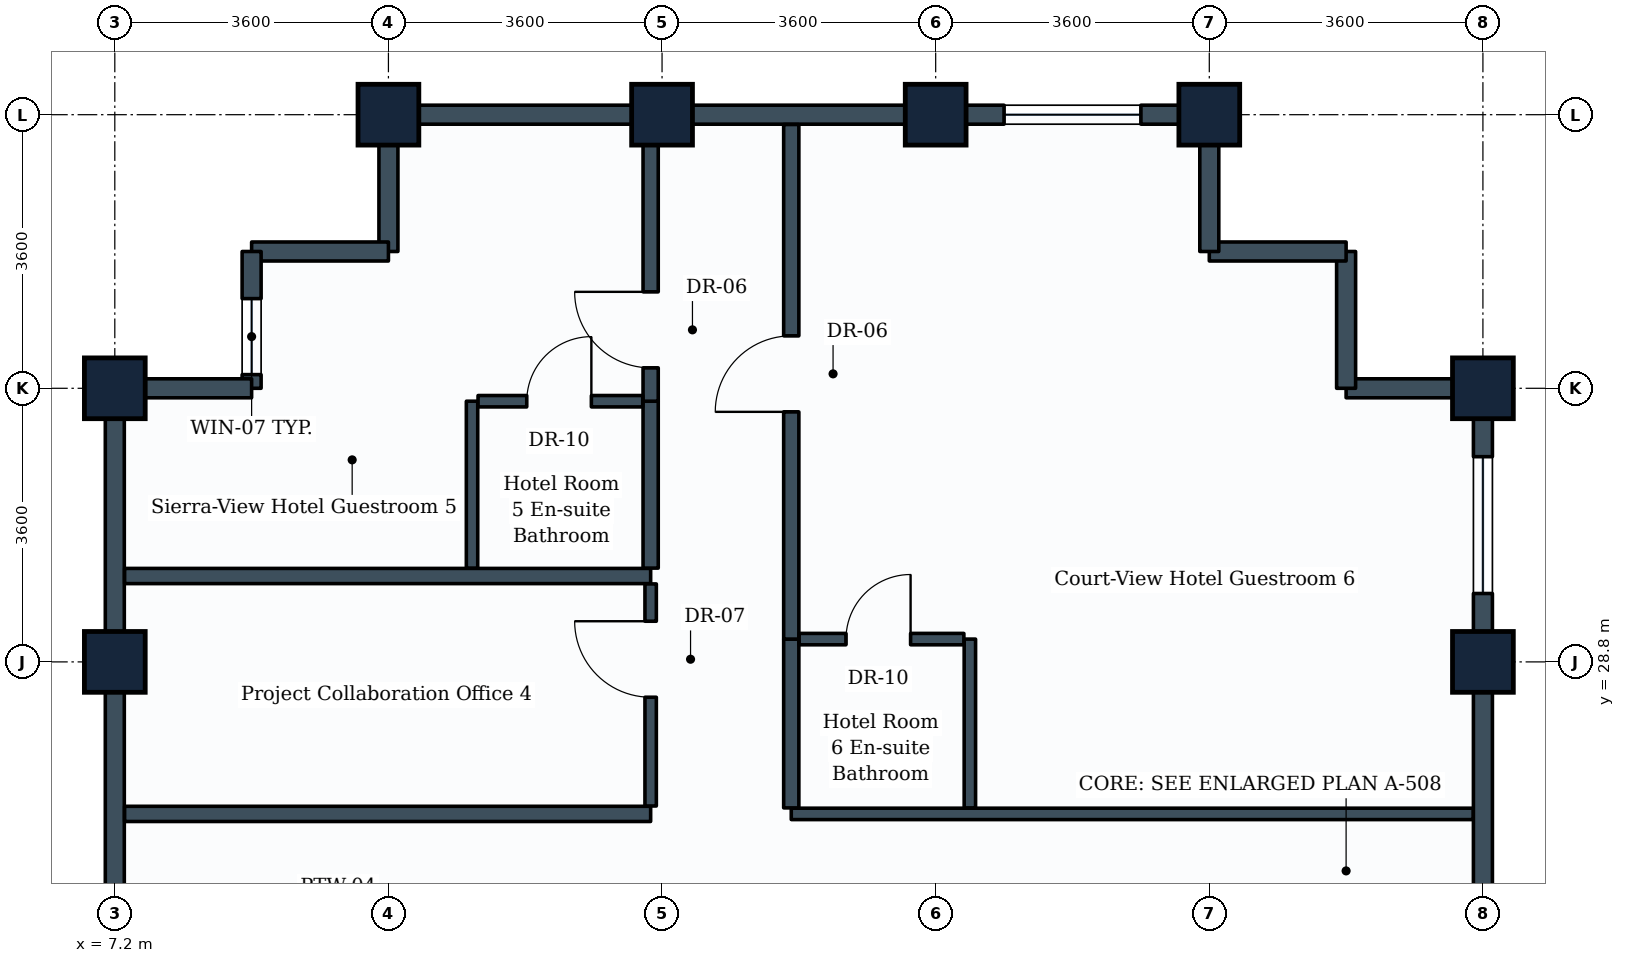
"""IFC4 building model, lengths in metres.
Left out: names, types, materials, properties, quantities, classifications, styles, units other than length and angle.
Written with IfcOpenShell. Run it as: python <this file> out.ifc"""

import sys

from ifc_helpers import new_model, si_unit, direction, frame, frame_2d, origin, origin_2d, place, context, subcontext, project, spatial, rectangle, extrude, element, fill, save


model = new_model("IFC4")
c1 = context("Model", 3, precision=1e-05, world=origin(), true_north=direction((0.0, 1.0)))
c2 = subcontext(c1, "Body", "Model", "MODEL_VIEW")
j1 = project(units=[si_unit("LENGTHUNIT", "METRE"), si_unit("PLANEANGLEUNIT", "RADIAN")], contexts=[c1])
p1 = place(None, origin())
s1 = spatial("IfcSite", under=j1, at=p1, CompositionType="ELEMENT")
p2 = place(p1, origin())
s2 = spatial("IfcBuilding", under=s1, at=p2, CompositionType="ELEMENT")
p3 = place(p2, frame((0.0, 0.0, 242.6)))
s3 = spatial("IfcBuildingStorey", under=s2, at=p3, CompositionType="ELEMENT", Elevation=242.6)
for number, where, z_axis, x_axis in (
    (1, (7.2, 28.8, 0.0), (0.0, 0.0, 1.0), (0.0, 1.0, 0.0)),
    (2, (7.2, 32.4, 0.0), (0.0, 0.0, 1.0), (0.0, 1.0, 0.0)),
    (3, (10.8, 36.0, 0.0), (0.0, 0.0, 1.0), (1.0, 0.0, 0.0)),
    (4, (14.4, 36.0, 0.0), (0.0, 0.0, 1.0), (1.0, 0.0, 0.0)),
    (5, (18.0, 36.0, 0.0), (0.0, 0.0, 1.0), (1.0, 0.0, 0.0)),
    (6, (21.6, 36.0, 0.0), (0.0, 0.0, 1.0), (1.0, 0.0, 0.0)),
    (7, (25.2, 28.8, 0.0), (0.0, 0.0, 1.0), (0.0, 1.0, 0.0)),
    (8, (25.2, 32.4, 0.0), (0.0, 0.0, 1.0), (0.0, 1.0, 0.0)),
):
    element("IfcColumn", number, at=place(p3, frame(where, z_axis=z_axis, x_axis=x_axis)), inside=s3, PredefinedType="COLUMN", context=c2, shape_type="SweptSolid", body=[
        extrude(rectangle(XDim=0.8, YDim=0.8, at=origin_2d()), origin(), (0.0, 0.0, 1.0), 3.6),
    ])
p4 = place(p3, frame((25.2, 28.8, 0.0), z_axis=(0.0, 0.0, 1.0), x_axis=(0.0, -1.0, 0.0)))
e9 = element("IfcWall", 9, at=p4, inside=s3, PredefinedType="STANDARD", context=c2, shape_type="SweptSolid", body=[
    extrude(rectangle(XDim=3.6, YDim=0.25, at=frame_2d((1.8, 0.0))), origin(), (0.0, 0.0, 1.0), 2.83),
])
p5 = place(p3, frame((25.2, 32.4, 0.0), z_axis=(0.0, 0.0, 1.0), x_axis=(0.0, -1.0, 0.0)))
e10 = element("IfcWall", 10, at=p5, inside=s3, PredefinedType="STANDARD", context=c2, shape_type="SweptSolid", body=[
    extrude(rectangle(XDim=3.6, YDim=0.25, at=frame_2d((1.8, 0.0))), origin(), (0.0, 0.0, 1.0), 2.83),
])
p6 = place(p5, frame((0.9, 0.0, 0.85)))
e11 = element("IfcOpeningElement", 11, at=p6, cuts=e10, PredefinedType="OPENING", context=c2, shape_type="SweptSolid", body=[
    extrude(rectangle(XDim=1.8, YDim=1.35, at=frame_2d((0.9, 0.675))), frame((0.0, 0.135, 0.0), z_axis=(0.0, -1.0, 0.0), x_axis=(1.0, 0.0, 0.0)), (0.0, 0.0, 1.0), 0.27),
])
p7 = place(p3, frame((23.4, 32.4, 0.0), z_axis=(0.0, 0.0, 1.0), x_axis=(1.0, 0.0, 0.0)))
e12 = element("IfcWall", 12, at=p7, inside=s3, PredefinedType="STANDARD", context=c2, shape_type="SweptSolid", body=[
    extrude(rectangle(XDim=1.8, YDim=0.25, at=frame_2d((0.9, 0.0))), origin(), (0.0, 0.0, 1.0), 2.83),
])
p8 = place(p3, frame((23.4, 32.4, 0.0), z_axis=(0.0, 0.0, 1.0), x_axis=(0.0, 1.0, 0.0)))
e13 = element("IfcWall", 13, at=p8, inside=s3, PredefinedType="STANDARD", context=c2, shape_type="SweptSolid", body=[
    extrude(rectangle(XDim=1.8, YDim=0.25, at=frame_2d((0.9, 0.0))), origin(), (0.0, 0.0, 1.0), 3.335),
])
p9 = place(p3, frame((21.6, 34.2, 0.0), z_axis=(0.0, 0.0, 1.0), x_axis=(1.0, 0.0, 0.0)))
e14 = element("IfcWall", 14, at=p9, inside=s3, PredefinedType="STANDARD", context=c2, shape_type="SweptSolid", body=[
    extrude(rectangle(XDim=1.8, YDim=0.25, at=frame_2d((0.9, 0.0))), origin(), (0.0, 0.0, 1.0), 3.335),
])
p10 = place(p3, frame((21.6, 34.2, 0.0), z_axis=(0.0, 0.0, 1.0), x_axis=(0.0, 1.0, 0.0)))
e15 = element("IfcWall", 15, at=p10, inside=s3, PredefinedType="STANDARD", context=c2, shape_type="SweptSolid", body=[
    extrude(rectangle(XDim=1.8, YDim=0.25, at=frame_2d((0.9, 0.0))), origin(), (0.0, 0.0, 1.0), 2.83),
])
p11 = place(p3, frame((18.0, 36.0, 0.0), z_axis=(0.0, 0.0, 1.0), x_axis=(1.0, 0.0, 0.0)))
e16 = element("IfcWall", 16, at=p11, inside=s3, PredefinedType="STANDARD", context=c2, shape_type="SweptSolid", body=[
    extrude(rectangle(XDim=3.6, YDim=0.25, at=frame_2d((1.8, 0.0))), origin(), (0.0, 0.0, 1.0), 2.83),
])
p12 = place(p11, frame((0.9, 0.0, 0.85)))
e17 = element("IfcOpeningElement", 17, at=p12, cuts=e16, PredefinedType="OPENING", context=c2, shape_type="SweptSolid", body=[
    extrude(rectangle(XDim=1.8, YDim=1.35, at=frame_2d((0.9, 0.675))), frame((0.0, 0.135, 0.0), z_axis=(0.0, -1.0, 0.0), x_axis=(1.0, 0.0, 0.0)), (0.0, 0.0, 1.0), 0.27),
])
p13 = place(p3, frame((14.4, 36.0, 0.0), z_axis=(0.0, 0.0, 1.0), x_axis=(1.0, 0.0, 0.0)))
e18 = element("IfcWall", 18, at=p13, inside=s3, PredefinedType="STANDARD", context=c2, shape_type="SweptSolid", body=[
    extrude(rectangle(XDim=3.6, YDim=0.25, at=frame_2d((1.8, 0.0))), origin(), (0.0, 0.0, 1.0), 2.83),
])
p14 = place(p3, frame((10.8, 36.0, 0.0), z_axis=(0.0, 0.0, 1.0), x_axis=(1.0, 0.0, 0.0)))
e19 = element("IfcWall", 19, at=p14, inside=s3, PredefinedType="STANDARD", context=c2, shape_type="SweptSolid", body=[
    extrude(rectangle(XDim=3.6, YDim=0.25, at=frame_2d((1.8, 0.0))), origin(), (0.0, 0.0, 1.0), 2.83),
])
p15 = place(p3, frame((10.8, 34.2, 0.0), z_axis=(0.0, 0.0, 1.0), x_axis=(0.0, 1.0, 0.0)))
e20 = element("IfcWall", 20, at=p15, inside=s3, PredefinedType="STANDARD", context=c2, shape_type="SweptSolid", body=[
    extrude(rectangle(XDim=1.8, YDim=0.25, at=frame_2d((0.9, 0.0))), origin(), (0.0, 0.0, 1.0), 2.83),
])
p16 = place(p3, frame((9.0, 34.2, 0.0), z_axis=(0.0, 0.0, 1.0), x_axis=(1.0, 0.0, 0.0)))
e21 = element("IfcWall", 21, at=p16, inside=s3, PredefinedType="STANDARD", context=c2, shape_type="SweptSolid", body=[
    extrude(rectangle(XDim=1.8, YDim=0.25, at=frame_2d((0.9, 0.0))), origin(), (0.0, 0.0, 1.0), 3.335),
])
p17 = place(p3, frame((9.0, 32.4, 0.0), z_axis=(0.0, 0.0, 1.0), x_axis=(0.0, 1.0, 0.0)))
e22 = element("IfcWall", 22, at=p17, inside=s3, PredefinedType="STANDARD", context=c2, shape_type="SweptSolid", body=[
    extrude(rectangle(XDim=1.8, YDim=0.25, at=frame_2d((0.9, 0.0))), origin(), (0.0, 0.0, 1.0), 3.335),
])
p18 = place(p17, frame((0.18, 0.0, 0.85)))
e23 = element("IfcOpeningElement", 23, at=p18, cuts=e22, PredefinedType="OPENING", context=c2, shape_type="SweptSolid", body=[
    extrude(rectangle(XDim=1.0, YDim=1.35, at=frame_2d((0.5, 0.675))), frame((0.0, 0.135, 0.0), z_axis=(0.0, -1.0, 0.0), x_axis=(1.0, 0.0, 0.0)), (0.0, 0.0, 1.0), 0.27),
])
p19 = place(p3, frame((7.2, 32.4, 0.0), z_axis=(0.0, 0.0, 1.0), x_axis=(1.0, 0.0, 0.0)))
e24 = element("IfcWall", 24, at=p19, inside=s3, PredefinedType="STANDARD", context=c2, shape_type="SweptSolid", body=[
    extrude(rectangle(XDim=1.8, YDim=0.25, at=frame_2d((0.9, 0.0))), origin(), (0.0, 0.0, 1.0), 2.83),
])
p20 = place(p3, frame((7.2, 28.8, 0.0), z_axis=(0.0, 0.0, 1.0), x_axis=(0.0, 1.0, 0.0)))
e25 = element("IfcWall", 25, at=p20, inside=s3, PredefinedType="STANDARD", context=c2, shape_type="SweptSolid", body=[
    extrude(rectangle(XDim=3.6, YDim=0.25, at=frame_2d((1.8, 0.0))), origin(), (0.0, 0.0, 1.0), 2.83),
])
p21 = place(p3, frame((7.2, 25.2, 0.0), z_axis=(0.0, 0.0, 1.0), x_axis=(0.0, 1.0, 0.0)))
e26 = element("IfcWall", 26, at=p21, inside=s3, PredefinedType="STANDARD", context=c2, shape_type="SweptSolid", body=[
    extrude(rectangle(XDim=3.6, YDim=0.25, at=frame_2d((1.8, 0.0))), origin(), (0.0, 0.0, 1.0), 2.83),
])
for number, where, z_axis, x_axis in (
    (27, (7.329, 26.8, 0.0), (0.0, 0.0, 1.0), (1.0, 0.0, 0.0)),
    (28, (7.329, 29.93, 0.0), (0.0, 0.0, 1.0), (1.0, 0.0, 0.0)),
):
    element("IfcWall", number, at=place(p3, frame(where, z_axis=z_axis, x_axis=x_axis)), inside=s3, PredefinedType="PARTITIONING", context=c2, shape_type="SweptSolid", body=[
        extrude(rectangle(XDim=6.921, YDim=0.2, at=frame_2d((3.46, 0.0))), origin(), (0.0, 0.0, 1.0), 2.83),
    ])
p22 = place(p3, frame((14.25, 26.904, 0.0), z_axis=(0.0, 0.0, 1.0), x_axis=(0.0, 1.0, 0.0)))
e29 = element("IfcWall", 29, at=p22, inside=s3, PredefinedType="PARTITIONING", context=c2, shape_type="SweptSolid", body=[
    extrude(rectangle(XDim=2.922, YDim=0.15, at=frame_2d((1.461, 0.0))), origin(), (0.0, 0.0, 1.0), 3.03),
])
p23 = place(p22, frame((1.431, 0.0, 0.0)))
e30 = element("IfcOpeningElement", 30, at=p23, cuts=e29, PredefinedType="OPENING", context=c2, shape_type="SweptSolid", body=[
    extrude(rectangle(XDim=1.0, YDim=2.1, at=frame_2d((0.5, 1.05))), frame((0.0, 0.085, 0.0), z_axis=(0.0, -1.0, 0.0), x_axis=(1.0, 0.0, 0.0)), (0.0, 0.0, 1.0), 0.17),
])
p24 = place(p3, frame((14.25, 30.034, 0.0), z_axis=(0.0, 0.0, 1.0), x_axis=(0.0, 1.0, 0.0)))
e31 = element("IfcWall", 31, at=p24, inside=s3, PredefinedType="PARTITIONING", context=c2, shape_type="SweptSolid", body=[
    extrude(rectangle(XDim=2.196, YDim=0.2, at=frame_2d((1.098, 0.0))), origin(), (0.0, 0.0, 1.0), 3.335),
])
p25 = place(p3, frame((14.25, 32.23, 0.0), z_axis=(0.0, 0.0, 1.0), x_axis=(0.0, 1.0, 0.0)))
e32 = element("IfcWall", 32, at=p25, inside=s3, PredefinedType="PARTITIONING", context=c2, shape_type="SweptSolid", body=[
    extrude(rectangle(XDim=3.641, YDim=0.2, at=frame_2d((1.821, 0.0))), origin(), (0.0, 0.0, 1.0), 2.83),
])
p26 = place(p25, frame((0.439, 0.0, 0.0)))
e33 = element("IfcOpeningElement", 33, at=p26, cuts=e32, PredefinedType="OPENING", context=c2, shape_type="SweptSolid", body=[
    extrude(rectangle(XDim=1.0, YDim=2.1, at=frame_2d((0.5, 1.05))), frame((0.0, 0.11, 0.0), z_axis=(0.0, -1.0, 0.0), x_axis=(1.0, 0.0, 0.0)), (0.0, 0.0, 1.0), 0.22),
])
p27 = place(p3, frame((11.9, 30.034, 0.0), z_axis=(0.0, 0.0, 1.0), x_axis=(0.0, 1.0, 0.0)))
e34 = element("IfcWall", 34, at=p27, inside=s3, PredefinedType="PARTITIONING", context=c2, shape_type="SweptSolid", body=[
    extrude(rectangle(XDim=2.196, YDim=0.15, at=frame_2d((1.098, 0.0))), origin(), (0.0, 0.0, 1.0), 3.335),
])
p28 = place(p3, frame((11.979, 32.23, 0.0), z_axis=(0.0, 0.0, 1.0), x_axis=(1.0, 0.0, 0.0)))
e35 = element("IfcWall", 35, at=p28, inside=s3, PredefinedType="PARTITIONING", context=c2, shape_type="SweptSolid", body=[
    extrude(rectangle(XDim=2.167, YDim=0.15, at=frame_2d((1.083, 0.0))), origin(), (0.0, 0.0, 1.0), 3.335),
])
p29 = place(p28, frame((0.641, 0.0, 0.0)))
e36 = element("IfcOpeningElement", 36, at=p29, cuts=e35, PredefinedType="OPENING", context=c2, shape_type="SweptSolid", body=[
    extrude(rectangle(XDim=0.85, YDim=2.1, at=frame_2d((0.425, 1.05))), frame((0.0, 0.085, 0.0), z_axis=(0.0, -1.0, 0.0), x_axis=(1.0, 0.0, 0.0)), (0.0, 0.0, 1.0), 0.17),
])
p30 = place(p3, frame((16.1, 26.8, 0.0), z_axis=(0.0, 0.0, 1.0), x_axis=(1.0, 0.0, 0.0)))
e37 = element("IfcWall", 37, at=p30, inside=s3, PredefinedType="PARTITIONING", context=c2, shape_type="SweptSolid", body=[
    extrude(rectangle(XDim=8.971, YDim=0.15, at=frame_2d((4.485, 0.0))), origin(), (0.0, 0.0, 1.0), 2.83),
])
p31 = place(p3, frame((16.1, 26.879, 0.0), z_axis=(0.0, 0.0, 1.0), x_axis=(0.0, 1.0, 0.0)))
e38 = element("IfcWall", 38, at=p31, inside=s3, PredefinedType="PARTITIONING", context=c2, shape_type="SweptSolid", body=[
    extrude(rectangle(XDim=2.221, YDim=0.2, at=frame_2d((1.111, 0.0))), origin(), (0.0, 0.0, 1.0), 3.03),
])
p32 = place(p3, frame((16.1, 29.1, 0.0), z_axis=(0.0, 0.0, 1.0), x_axis=(0.0, 1.0, 0.0)))
e39 = element("IfcWall", 39, at=p32, inside=s3, PredefinedType="PARTITIONING", context=c2, shape_type="SweptSolid", body=[
    extrude(rectangle(XDim=6.771, YDim=0.2, at=frame_2d((3.385, 0.0))), origin(), (0.0, 0.0, 1.0), 2.83),
])
p33 = place(p32, frame((2.99, 0.0, 0.0)))
e40 = element("IfcOpeningElement", 40, at=p33, cuts=e39, PredefinedType="OPENING", context=c2, shape_type="SweptSolid", body=[
    extrude(rectangle(XDim=1.0, YDim=2.1, at=frame_2d((0.5, 1.05))), frame((0.0, 0.11, 0.0), z_axis=(0.0, -1.0, 0.0), x_axis=(1.0, 0.0, 0.0)), (0.0, 0.0, 1.0), 0.22),
])
p34 = place(p3, frame((18.45, 26.879, 0.0), z_axis=(0.0, 0.0, 1.0), x_axis=(0.0, 1.0, 0.0)))
e41 = element("IfcWall", 41, at=p34, inside=s3, PredefinedType="PARTITIONING", context=c2, shape_type="SweptSolid", body=[
    extrude(rectangle(XDim=2.221, YDim=0.15, at=frame_2d((1.111, 0.0))), origin(), (0.0, 0.0, 1.0), 3.03),
])
p35 = place(p3, frame((16.204, 29.1, 0.0), z_axis=(0.0, 0.0, 1.0), x_axis=(1.0, 0.0, 0.0)))
e42 = element("IfcWall", 42, at=p35, inside=s3, PredefinedType="PARTITIONING", context=c2, shape_type="SweptSolid", body=[
    extrude(rectangle(XDim=2.167, YDim=0.15, at=frame_2d((1.083, 0.0))), origin(), (0.0, 0.0, 1.0), 3.03),
])
p36 = place(p35, frame((0.616, 0.0, 0.0)))
e43 = element("IfcOpeningElement", 43, at=p36, cuts=e42, PredefinedType="OPENING", context=c2, shape_type="SweptSolid", body=[
    extrude(rectangle(XDim=0.85, YDim=2.1, at=frame_2d((0.425, 1.05))), frame((0.0, 0.085, 0.0), z_axis=(0.0, -1.0, 0.0), x_axis=(1.0, 0.0, 0.0)), (0.0, 0.0, 1.0), 0.17),
])
p37 = place(p6, origin())
e44 = element("IfcWindow", 44, at=p37, inside=s3, PartitioningType="SINGLE_PANEL", PredefinedType="WINDOW", context=c2, shape_type="SweptSolid", body=[
    extrude(rectangle(XDim=1.8, YDim=1.35, at=frame_2d((0.9, 0.675))), frame((0.0, 0.03, 0.0), z_axis=(0.0, -1.0, 0.0), x_axis=(1.0, 0.0, 0.0)), (0.0, 0.0, 1.0), 0.06),
])
fill(e11, e44)
p38 = place(p12, origin())
e45 = element("IfcWindow", 45, at=p38, inside=s3, PartitioningType="SINGLE_PANEL", PredefinedType="WINDOW", context=c2, shape_type="SweptSolid", body=[
    extrude(rectangle(XDim=1.8, YDim=1.35, at=frame_2d((0.9, 0.675))), frame((0.0, 0.03, 0.0), z_axis=(0.0, -1.0, 0.0), x_axis=(1.0, 0.0, 0.0)), (0.0, 0.0, 1.0), 0.06),
])
fill(e17, e45)
p39 = place(p23, origin())
e46 = element("IfcDoor", 46, at=p39, inside=s3, OperationType="SINGLE_SWING_RIGHT", PredefinedType="DOOR", context=c2, shape_type="SweptSolid", body=[
    extrude(rectangle(XDim=1.0, YDim=2.1, at=frame_2d((0.5, 1.05))), frame((0.0, 0.025, 0.0), z_axis=(0.0, -1.0, 0.0), x_axis=(1.0, 0.0, 0.0)), (0.0, 0.0, 1.0), 0.05),
])
fill(e30, e46)
p40 = place(p26, origin())
e47 = element("IfcDoor", 47, at=p40, inside=s3, OperationType="SINGLE_SWING_RIGHT", PredefinedType="DOOR", context=c2, shape_type="SweptSolid", body=[
    extrude(rectangle(XDim=1.0, YDim=2.1, at=frame_2d((0.5, 1.05))), frame((0.0, 0.025, 0.0), z_axis=(0.0, -1.0, 0.0), x_axis=(1.0, 0.0, 0.0)), (0.0, 0.0, 1.0), 0.05),
])
fill(e33, e47)
p41 = place(p29, origin())
e48 = element("IfcDoor", 48, at=p41, inside=s3, OperationType="SINGLE_SWING_RIGHT", PredefinedType="DOOR", context=c2, shape_type="SweptSolid", body=[
    extrude(rectangle(XDim=0.85, YDim=2.1, at=frame_2d((0.425, 1.05))), frame((0.0, 0.025, 0.0), z_axis=(0.0, -1.0, 0.0), x_axis=(1.0, 0.0, 0.0)), (0.0, 0.0, 1.0), 0.05),
])
fill(e36, e48)
p42 = place(p33, origin())
e49 = element("IfcDoor", 49, at=p42, inside=s3, OperationType="SINGLE_SWING_LEFT", PredefinedType="DOOR", context=c2, shape_type="SweptSolid", body=[
    extrude(rectangle(XDim=1.0, YDim=2.1, at=frame_2d((0.5, 1.05))), frame((0.0, 0.025, 0.0), z_axis=(0.0, -1.0, 0.0), x_axis=(1.0, 0.0, 0.0)), (0.0, 0.0, 1.0), 0.05),
])
fill(e40, e49)
p43 = place(p36, origin())
e50 = element("IfcDoor", 50, at=p43, inside=s3, OperationType="SINGLE_SWING_RIGHT", PredefinedType="DOOR", context=c2, shape_type="SweptSolid", body=[
    extrude(rectangle(XDim=0.85, YDim=2.1, at=frame_2d((0.425, 1.05))), frame((0.0, 0.025, 0.0), z_axis=(0.0, -1.0, 0.0), x_axis=(1.0, 0.0, 0.0)), (0.0, 0.0, 1.0), 0.05),
])
fill(e43, e50)
p44 = place(p18, origin())
e51 = element("IfcWindow", 51, at=p44, inside=s3, PartitioningType="SINGLE_PANEL", PredefinedType="WINDOW", context=c2, shape_type="SweptSolid", body=[
    extrude(rectangle(XDim=1.0, YDim=1.35, at=frame_2d((0.5, 0.675))), frame((0.0, 0.03, 0.0), z_axis=(0.0, -1.0, 0.0), x_axis=(1.0, 0.0, 0.0)), (0.0, 0.0, 1.0), 0.06),
])
fill(e23, e51)
save(model, sys.argv[1])
